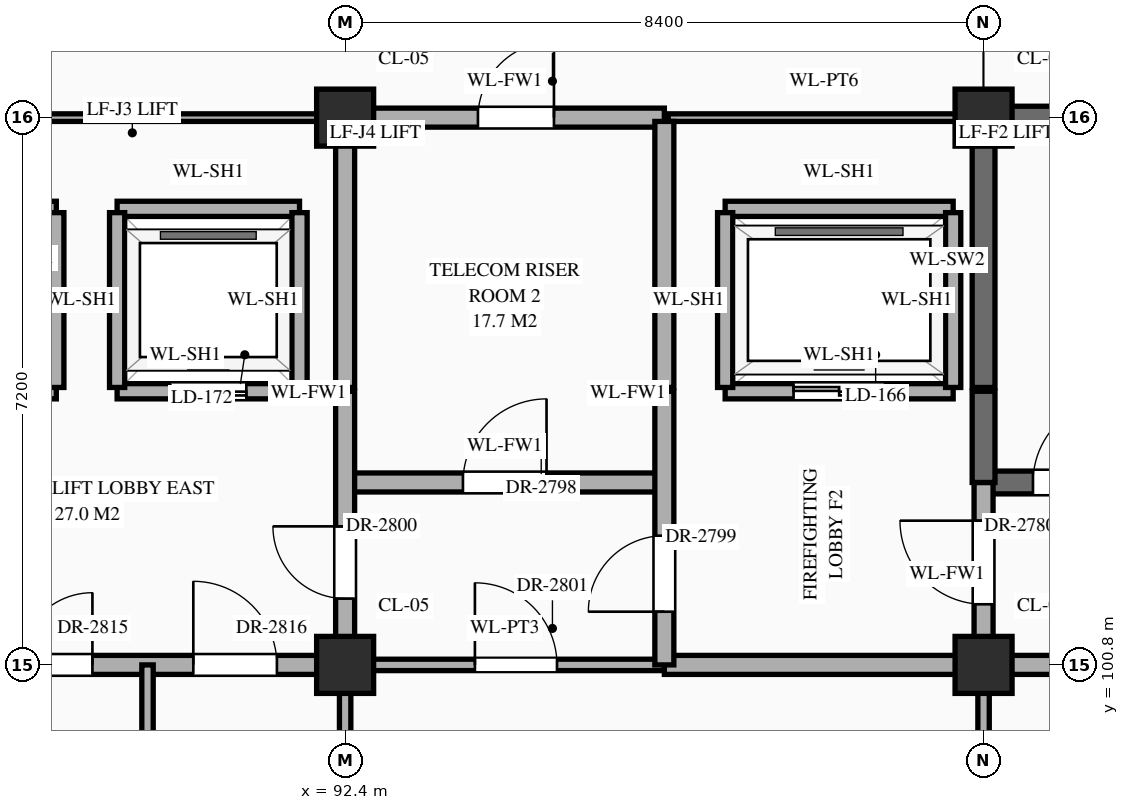
"""IFC4 building model, lengths in metres.
Left out: names, types, materials, properties, quantities, classifications, styles, units other than length and angle.
Written with IfcOpenShell. Run it as: python <this file> out.ifc"""

import sys

from ifc_helpers import new_model, si_unit, direction, frame, frame_2d, origin, origin_2d, place, context, subcontext, project, spatial, rectangle, extrude, element, fill, save


model = new_model("IFC4")
c1 = context("Model", 3, precision=1e-05, world=origin(), true_north=direction((0.0, 1.0)))
c2 = subcontext(c1, "Body", "Model", "MODEL_VIEW")
j1 = project(units=[si_unit("LENGTHUNIT", "METRE"), si_unit("PLANEANGLEUNIT", "RADIAN")], contexts=[c1])
p1 = place(None, origin())
s1 = spatial("IfcSite", under=j1, at=p1, CompositionType="ELEMENT")
p2 = place(p1, origin())
s2 = spatial("IfcBuilding", under=s1, at=p2, CompositionType="ELEMENT")
p3 = place(p2, frame((0.0, 0.0, 43.5)))
s3 = spatial("IfcBuildingStorey", under=s2, at=p3, CompositionType="ELEMENT", Elevation=43.5)
for number, where, z_axis, x_axis in (
    (1, (92.4, 100.8, 0.0), (0.0, 0.0, 1.0), (1.0, 0.0, 0.0)),
    (2, (92.4, 108.0, 0.0), (0.0, 0.0, 1.0), (1.0, 0.0, 0.0)),
    (3, (100.8, 100.8, 0.0), (0.0, 0.0, 1.0), (1.0, 0.0, 0.0)),
    (4, (100.8, 108.0, 0.0), (0.0, 0.0, 1.0), (1.0, 0.0, 0.0)),
):
    element("IfcColumn", number, at=place(p3, frame(where, z_axis=z_axis, x_axis=x_axis)), inside=s3, PredefinedType="COLUMN", context=c2, shape_type="SweptSolid", body=[
        extrude(rectangle(XDim=0.75, YDim=0.75, at=origin_2d()), origin(), (0.0, 0.0, 1.0), 4.2),
    ])
p4 = place(p3, frame((75.6, 100.8, 0.0), z_axis=(0.0, 0.0, 1.0), x_axis=(1.0, 0.0, 0.0)))
e5 = element("IfcWall", 5, at=p4, inside=s3, PredefinedType="STANDARD", context=c2, shape_type="SweptSolid", body=[
    extrude(rectangle(XDim=16.8, YDim=0.25, at=frame_2d((8.4, 0.0))), origin(), (0.0, 0.0, 1.0), 3.1),
])
p5 = place(p4, frame((3.725, 0.0, 0.0)))
e6 = element("IfcOpeningElement", 6, at=p5, cuts=e5, PredefinedType="OPENING", context=c2, shape_type="SweptSolid", body=[
    extrude(rectangle(XDim=0.95, YDim=2.15, at=frame_2d((0.475, 1.075))), frame((0.0, 0.137, 0.0), z_axis=(0.0, -1.0, 0.0), x_axis=(1.0, 0.0, 0.0)), (0.0, 0.0, 1.0), 0.274),
])
p6 = place(p4, frame((9.748, 0.0, 0.0)))
e7 = element("IfcOpeningElement", 7, at=p6, cuts=e5, PredefinedType="OPENING", context=c2, shape_type="SweptSolid", body=[
    extrude(rectangle(XDim=1.0, YDim=2.2, at=frame_2d((0.5, 1.1))), frame((0.0, 0.137, 0.0), z_axis=(0.0, -1.0, 0.0), x_axis=(1.0, 0.0, 0.0)), (0.0, 0.0, 1.0), 0.274),
])
p7 = place(p4, frame((12.525, 0.0, 0.0)))
e8 = element("IfcOpeningElement", 8, at=p7, cuts=e5, PredefinedType="OPENING", context=c2, shape_type="SweptSolid", body=[
    extrude(rectangle(XDim=0.95, YDim=2.15, at=frame_2d((0.475, 1.075))), frame((0.0, 0.137, 0.0), z_axis=(0.0, -1.0, 0.0), x_axis=(1.0, 0.0, 0.0)), (0.0, 0.0, 1.0), 0.274),
])
p8 = place(p4, frame((14.802, 0.0, 0.0)))
e9 = element("IfcOpeningElement", 9, at=p8, cuts=e5, PredefinedType="OPENING", context=c2, shape_type="SweptSolid", body=[
    extrude(rectangle(XDim=1.1, YDim=2.2, at=frame_2d((0.55, 1.1))), frame((0.0, 0.137, 0.0), z_axis=(0.0, -1.0, 0.0), x_axis=(1.0, 0.0, 0.0)), (0.0, 0.0, 1.0), 0.274),
])
p9 = place(p3, frame((92.4, 100.8, 0.0), z_axis=(0.0, 0.0, 1.0), x_axis=(1.0, 0.0, 0.0)))
e10 = element("IfcWall", 10, at=p9, inside=s3, PredefinedType="STANDARD", context=c2, shape_type="SweptSolid", body=[
    extrude(rectangle(XDim=4.2, YDim=0.15, at=frame_2d((2.1, 0.0))), origin(), (0.0, 0.0, 1.0), 3.1),
])
p10 = place(p9, frame((1.708, 0.0, 0.0)))
e11 = element("IfcOpeningElement", 11, at=p10, cuts=e10, PredefinedType="OPENING", context=c2, shape_type="SweptSolid", body=[
    extrude(rectangle(XDim=1.08, YDim=2.25, at=frame_2d((0.54, 1.125))), frame((0.0, 0.087, 0.0), z_axis=(0.0, -1.0, 0.0), x_axis=(1.0, 0.0, 0.0)), (0.0, 0.0, 1.0), 0.174),
])
p11 = place(p3, frame((96.6, 100.8, 0.0), z_axis=(0.0, 0.0, 1.0), x_axis=(1.0, 0.0, 0.0)))
e12 = element("IfcWall", 12, at=p11, inside=s3, PredefinedType="STANDARD", context=c2, shape_type="SweptSolid", body=[
    extrude(rectangle(XDim=12.6, YDim=0.25, at=frame_2d((6.3, 0.0))), origin(), (0.0, 0.0, 1.0), 3.1),
])
p12 = place(p11, frame((7.925, 0.0, 0.0)))
e13 = element("IfcOpeningElement", 13, at=p12, cuts=e12, PredefinedType="OPENING", context=c2, shape_type="SweptSolid", body=[
    extrude(rectangle(XDim=0.95, YDim=2.15, at=frame_2d((0.475, 1.075))), frame((0.0, 0.137, 0.0), z_axis=(0.0, -1.0, 0.0), x_axis=(1.0, 0.0, 0.0)), (0.0, 0.0, 1.0), 0.274),
])
p13 = place(p3, frame((92.4, 103.2, 0.0), z_axis=(0.0, 0.0, 1.0), x_axis=(1.0, 0.0, 0.0)))
e14 = element("IfcWall", 14, at=p13, inside=s3, PredefinedType="STANDARD", context=c2, shape_type="SweptSolid", body=[
    extrude(rectangle(XDim=4.2, YDim=0.25, at=frame_2d((2.1, 0.0))), origin(), (0.0, 0.0, 1.0), 3.95),
])
p14 = place(p13, frame((1.55, 0.0, 0.0)))
e15 = element("IfcOpeningElement", 15, at=p14, cuts=e14, PredefinedType="OPENING", context=c2, shape_type="SweptSolid", body=[
    extrude(rectangle(XDim=1.1, YDim=2.2, at=frame_2d((0.55, 1.1))), frame((0.0, 0.137, 0.0), z_axis=(0.0, -1.0, 0.0), x_axis=(1.0, 0.0, 0.0)), (0.0, 0.0, 1.0), 0.274),
])
p15 = place(p3, frame((100.8, 103.2, 0.0), z_axis=(0.0, 0.0, 1.0), x_axis=(1.0, 0.0, 0.0)))
e16 = element("IfcWall", 16, at=p15, inside=s3, PredefinedType="SHEAR", context=c2, shape_type="SweptSolid", body=[
    extrude(rectangle(XDim=8.4, YDim=0.3, at=frame_2d((4.2, 0.0))), origin(), (0.0, 0.0, 1.0), 3.95),
])
p16 = place(p15, frame((0.65, 0.0, 0.0)))
e17 = element("IfcOpeningElement", 17, at=p16, cuts=e16, PredefinedType="OPENING", context=c2, shape_type="SweptSolid", body=[
    extrude(rectangle(XDim=1.1, YDim=2.2, at=frame_2d((0.55, 1.1))), frame((0.0, 0.162, 0.0), z_axis=(0.0, -1.0, 0.0), x_axis=(1.0, 0.0, 0.0)), (0.0, 0.0, 1.0), 0.324),
])
p17 = place(p3, frame((86.2, 104.4, 0.0), z_axis=(0.0, 0.0, 1.0), x_axis=(1.0, 0.0, 0.0)))
e18 = element("IfcWall", 18, at=p17, inside=s3, PredefinedType="STANDARD", context=c2, shape_type="SweptSolid", body=[
    extrude(rectangle(XDim=2.4, YDim=0.2, at=frame_2d((1.2, 0.0))), origin(), (0.0, 0.0, 1.0), 3.95),
])
p18 = place(p17, frame((0.7, 0.0, 0.0)))
e19 = element("IfcOpeningElement", 19, at=p18, cuts=e18, PredefinedType="OPENING", context=c2, shape_type="SweptSolid", body=[
    extrude(rectangle(XDim=1.0, YDim=2.15, at=frame_2d((0.5, 1.075))), frame((0.0, 0.112, 0.0), z_axis=(0.0, -1.0, 0.0), x_axis=(1.0, 0.0, 0.0)), (0.0, 0.0, 1.0), 0.224),
])
p19 = place(p3, frame((89.4, 104.4, 0.0), z_axis=(0.0, 0.0, 1.0), x_axis=(1.0, 0.0, 0.0)))
e20 = element("IfcWall", 20, at=p19, inside=s3, PredefinedType="STANDARD", context=c2, shape_type="SweptSolid", body=[
    extrude(rectangle(XDim=2.4, YDim=0.2, at=frame_2d((1.2, 0.0))), origin(), (0.0, 0.0, 1.0), 3.95),
])
p20 = place(p19, frame((0.7, 0.0, 0.0)))
e21 = element("IfcOpeningElement", 21, at=p20, cuts=e20, PredefinedType="OPENING", context=c2, shape_type="SweptSolid", body=[
    extrude(rectangle(XDim=1.0, YDim=2.15, at=frame_2d((0.5, 1.075))), frame((0.0, 0.112, 0.0), z_axis=(0.0, -1.0, 0.0), x_axis=(1.0, 0.0, 0.0)), (0.0, 0.0, 1.0), 0.224),
])
p21 = place(p3, frame((97.4, 104.4, 0.0), z_axis=(0.0, 0.0, 1.0), x_axis=(1.0, 0.0, 0.0)))
e22 = element("IfcWall", 22, at=p21, inside=s3, PredefinedType="STANDARD", context=c2, shape_type="SweptSolid", body=[
    extrude(rectangle(XDim=3.0, YDim=0.2, at=frame_2d((1.5, 0.0))), origin(), (0.0, 0.0, 1.0), 3.95),
])
p22 = place(p21, frame((0.9, 0.0, 0.0)))
e23 = element("IfcOpeningElement", 23, at=p22, cuts=e22, PredefinedType="OPENING", context=c2, shape_type="SweptSolid", body=[
    extrude(rectangle(XDim=1.2, YDim=2.15, at=frame_2d((0.6, 1.075))), frame((0.0, 0.112, 0.0), z_axis=(0.0, -1.0, 0.0), x_axis=(1.0, 0.0, 0.0)), (0.0, 0.0, 1.0), 0.224),
])
for number, where, z_axis, x_axis in (
    (24, (86.2, 106.8, 0.0), (0.0, 0.0, 1.0), (1.0, 0.0, 0.0)),
    (25, (89.4, 106.8, 0.0), (0.0, 0.0, 1.0), (1.0, 0.0, 0.0)),
):
    element("IfcWall", number, at=place(p3, frame(where, z_axis=z_axis, x_axis=x_axis)), inside=s3, PredefinedType="STANDARD", context=c2, shape_type="SweptSolid", body=[
        extrude(rectangle(XDim=2.4, YDim=0.2, at=frame_2d((1.2, 0.0))), origin(), (0.0, 0.0, 1.0), 3.95),
    ])
p23 = place(p3, frame((97.4, 106.8, 0.0), z_axis=(0.0, 0.0, 1.0), x_axis=(1.0, 0.0, 0.0)))
e26 = element("IfcWall", 26, at=p23, inside=s3, PredefinedType="STANDARD", context=c2, shape_type="SweptSolid", body=[
    extrude(rectangle(XDim=3.0, YDim=0.2, at=frame_2d((1.5, 0.0))), origin(), (0.0, 0.0, 1.0), 3.95),
])
p24 = place(p3, frame((86.2, 108.0, 0.0), z_axis=(0.0, 0.0, 1.0), x_axis=(1.0, 0.0, 0.0)))
e27 = element("IfcWall", 27, at=p24, inside=s3, PredefinedType="STANDARD", context=c2, shape_type="SweptSolid", body=[
    extrude(rectangle(XDim=6.15, YDim=0.1, at=frame_2d((3.075, 0.0))), origin(), (0.0, 0.0, 1.0), 3.1),
])
p25 = place(p3, frame((92.4, 108.0, 0.0), z_axis=(0.0, 0.0, 1.0), x_axis=(1.0, 0.0, 0.0)))
e28 = element("IfcWall", 28, at=p25, inside=s3, PredefinedType="STANDARD", context=c2, shape_type="SweptSolid", body=[
    extrude(rectangle(XDim=4.2, YDim=0.25, at=frame_2d((2.1, 0.0))), origin(), (0.0, 0.0, 1.0), 3.1),
])
p26 = place(p25, frame((1.748, 0.0, 0.0)))
e29 = element("IfcOpeningElement", 29, at=p26, cuts=e28, PredefinedType="OPENING", context=c2, shape_type="SweptSolid", body=[
    extrude(rectangle(XDim=1.0, YDim=2.2, at=frame_2d((0.5, 1.1))), frame((0.0, 0.137, 0.0), z_axis=(0.0, -1.0, 0.0), x_axis=(1.0, 0.0, 0.0)), (0.0, 0.0, 1.0), 0.274),
])
p27 = place(p3, frame((96.65, 108.0, 0.0), z_axis=(0.0, 0.0, 1.0), x_axis=(1.0, 0.0, 0.0)))
e30 = element("IfcWall", 30, at=p27, inside=s3, PredefinedType="STANDARD", context=c2, shape_type="SweptSolid", body=[
    extrude(rectangle(XDim=4.1, YDim=0.1, at=frame_2d((2.05, 0.0))), origin(), (0.0, 0.0, 1.0), 3.1),
])
p28 = place(p3, frame((100.8, 108.0, 0.0), z_axis=(0.0, 0.0, 1.0), x_axis=(1.0, 0.0, 0.0)))
e31 = element("IfcWall", 31, at=p28, inside=s3, PredefinedType="SHEAR", context=c2, shape_type="SweptSolid", body=[
    extrude(rectangle(XDim=8.4, YDim=0.3, at=frame_2d((4.2, 0.0))), origin(), (0.0, 0.0, 1.0), 3.95),
])
for number, where, z_axis, x_axis in (
    (32, (88.6, 104.45, 0.0), (0.0, 0.0, 1.0), (0.0, 1.0, 0.0)),
    (33, (89.4, 104.45, 0.0), (0.0, 0.0, 1.0), (0.0, 1.0, 0.0)),
):
    element("IfcWall", number, at=place(p3, frame(where, z_axis=z_axis, x_axis=x_axis)), inside=s3, PredefinedType="STANDARD", context=c2, shape_type="SweptSolid", body=[
        extrude(rectangle(XDim=2.3, YDim=0.2, at=frame_2d((1.15, 0.0))), origin(), (0.0, 0.0, 1.0), 3.95),
    ])
p29 = place(p3, frame((89.8, 96.0, 0.0), z_axis=(0.0, 0.0, 1.0), x_axis=(0.0, 1.0, 0.0)))
e34 = element("IfcWall", 34, at=p29, inside=s3, PredefinedType="STANDARD", context=c2, shape_type="SweptSolid", body=[
    extrude(rectangle(XDim=4.8, YDim=0.15, at=frame_2d((2.4, 0.0))), origin(), (0.0, 0.0, 1.0), 3.95),
])
p30 = place(p29, frame((1.84, 0.0, 0.0)))
e35 = element("IfcOpeningElement", 35, at=p30, cuts=e34, PredefinedType="OPENING", context=c2, shape_type="SweptSolid", body=[
    extrude(rectangle(XDim=1.12, YDim=2.25, at=frame_2d((0.56, 1.125))), frame((0.0, 0.087, 0.0), z_axis=(0.0, -1.0, 0.0), x_axis=(1.0, 0.0, 0.0)), (0.0, 0.0, 1.0), 0.174),
])
p31 = place(p3, frame((91.8, 104.45, 0.0), z_axis=(0.0, 0.0, 1.0), x_axis=(0.0, 1.0, 0.0)))
e36 = element("IfcWall", 36, at=p31, inside=s3, PredefinedType="STANDARD", context=c2, shape_type="SweptSolid", body=[
    extrude(rectangle(XDim=2.3, YDim=0.2, at=frame_2d((1.15, 0.0))), origin(), (0.0, 0.0, 1.0), 3.95),
])
p32 = place(p3, frame((92.4, 96.0, 0.0), z_axis=(0.0, 0.0, 1.0), x_axis=(0.0, 1.0, 0.0)))
e37 = element("IfcWall", 37, at=p32, inside=s3, PredefinedType="STANDARD", context=c2, shape_type="SweptSolid", body=[
    extrude(rectangle(XDim=4.8, YDim=0.15, at=frame_2d((2.4, 0.0))), origin(), (0.0, 0.0, 1.0), 3.2),
])
p33 = place(p3, frame((92.4, 100.8, 0.0), z_axis=(0.0, 0.0, 1.0), x_axis=(0.0, 1.0, 0.0)))
e38 = element("IfcWall", 38, at=p33, inside=s3, PredefinedType="STANDARD", context=c2, shape_type="SweptSolid", body=[
    extrude(rectangle(XDim=3.6, YDim=0.25, at=frame_2d((1.8, 0.0))), origin(), (0.0, 0.0, 1.0), 3.2),
])
p34 = place(p33, frame((0.873, 0.0, 0.0)))
e39 = element("IfcOpeningElement", 39, at=p34, cuts=e38, PredefinedType="OPENING", context=c2, shape_type="SweptSolid", body=[
    extrude(rectangle(XDim=0.95, YDim=2.15, at=frame_2d((0.475, 1.075))), frame((0.0, 0.137, 0.0), z_axis=(0.0, -1.0, 0.0), x_axis=(1.0, 0.0, 0.0)), (0.0, 0.0, 1.0), 0.274),
])
p35 = place(p3, frame((92.4, 104.45, 0.0), z_axis=(0.0, 0.0, 1.0), x_axis=(0.0, 1.0, 0.0)))
e40 = element("IfcWall", 40, at=p35, inside=s3, PredefinedType="STANDARD", context=c2, shape_type="SweptSolid", body=[
    extrude(rectangle(XDim=3.5, YDim=0.25, at=frame_2d((1.75, 0.0))), origin(), (0.0, 0.0, 1.0), 3.2),
])
p36 = place(p3, frame((96.6, 100.8, 0.0), z_axis=(0.0, 0.0, 1.0), x_axis=(0.0, 1.0, 0.0)))
e41 = element("IfcWall", 41, at=p36, inside=s3, PredefinedType="STANDARD", context=c2, shape_type="SweptSolid", body=[
    extrude(rectangle(XDim=3.6, YDim=0.25, at=frame_2d((1.8, 0.0))), origin(), (0.0, 0.0, 1.0), 3.95),
])
p37 = place(p36, frame((0.7, 0.0, 0.0)))
e42 = element("IfcOpeningElement", 42, at=p37, cuts=e41, PredefinedType="OPENING", context=c2, shape_type="SweptSolid", body=[
    extrude(rectangle(XDim=1.0, YDim=2.2, at=frame_2d((0.5, 1.1))), frame((0.0, 0.137, 0.0), z_axis=(0.0, -1.0, 0.0), x_axis=(1.0, 0.0, 0.0)), (0.0, 0.0, 1.0), 0.274),
])
p38 = place(p3, frame((96.6, 104.45, 0.0), z_axis=(0.0, 0.0, 1.0), x_axis=(0.0, 1.0, 0.0)))
e43 = element("IfcWall", 43, at=p38, inside=s3, PredefinedType="STANDARD", context=c2, shape_type="SweptSolid", body=[
    extrude(rectangle(XDim=3.5, YDim=0.25, at=frame_2d((1.75, 0.0))), origin(), (0.0, 0.0, 1.0), 3.95),
])
for number, where, z_axis, x_axis in (
    (44, (97.4, 104.45, 0.0), (0.0, 0.0, 1.0), (0.0, 1.0, 0.0)),
    (45, (100.4, 104.45, 0.0), (0.0, 0.0, 1.0), (0.0, 1.0, 0.0)),
):
    element("IfcWall", number, at=place(p3, frame(where, z_axis=z_axis, x_axis=x_axis)), inside=s3, PredefinedType="STANDARD", context=c2, shape_type="SweptSolid", body=[
        extrude(rectangle(XDim=2.3, YDim=0.2, at=frame_2d((1.15, 0.0))), origin(), (0.0, 0.0, 1.0), 3.95),
    ])
p39 = place(p3, frame((100.8, 96.0, 0.0), z_axis=(0.0, 0.0, 1.0), x_axis=(0.0, 1.0, 0.0)))
e46 = element("IfcWall", 46, at=p39, inside=s3, PredefinedType="STANDARD", context=c2, shape_type="SweptSolid", body=[
    extrude(rectangle(XDim=4.8, YDim=0.15, at=frame_2d((2.4, 0.0))), origin(), (0.0, 0.0, 1.0), 3.2),
])
p40 = place(p3, frame((100.8, 100.8, 0.0), z_axis=(0.0, 0.0, 1.0), x_axis=(0.0, 1.0, 0.0)))
e47 = element("IfcWall", 47, at=p40, inside=s3, PredefinedType="STANDARD", context=c2, shape_type="SweptSolid", body=[
    extrude(rectangle(XDim=2.4, YDim=0.25, at=frame_2d((1.2, 0.0))), origin(), (0.0, 0.0, 1.0), 3.2),
])
p41 = place(p40, frame((0.798, 0.0, 0.0)))
e48 = element("IfcOpeningElement", 48, at=p41, cuts=e47, PredefinedType="OPENING", context=c2, shape_type="SweptSolid", body=[
    extrude(rectangle(XDim=1.1, YDim=2.2, at=frame_2d((0.55, 1.1))), frame((0.0, 0.137, 0.0), z_axis=(0.0, -1.0, 0.0), x_axis=(1.0, 0.0, 0.0)), (0.0, 0.0, 1.0), 0.274),
])
p42 = place(p3, frame((100.8, 103.2, 0.0), z_axis=(0.0, 0.0, 1.0), x_axis=(0.0, 1.0, 0.0)))
e49 = element("IfcWall", 49, at=p42, inside=s3, PredefinedType="SHEAR", context=c2, shape_type="SweptSolid", body=[
    extrude(rectangle(XDim=1.2, YDim=0.3, at=frame_2d((0.6, 0.0))), origin(), (0.0, 0.0, 1.0), 3.95),
])
p43 = place(p3, frame((100.8, 104.45, 0.0), z_axis=(0.0, 0.0, 1.0), x_axis=(0.0, 1.0, 0.0)))
e50 = element("IfcWall", 50, at=p43, inside=s3, PredefinedType="SHEAR", context=c2, shape_type="SweptSolid", body=[
    extrude(rectangle(XDim=3.5, YDim=0.3, at=frame_2d((1.75, 0.0))), origin(), (0.0, 0.0, 1.0), 3.95),
])
p44 = place(p22, origin())
e51 = element("IfcDoor", 51, at=p44, inside=s3, OperationType="DOUBLE_DOOR_SLIDING", PredefinedType="DOOR", context=c2, shape_type="SweptSolid", body=[
    extrude(rectangle(XDim=1.2, YDim=2.15, at=frame_2d((0.6, 1.075))), frame((0.0, 0.025, 0.0), z_axis=(0.0, -1.0, 0.0), x_axis=(1.0, 0.0, 0.0)), (0.0, 0.0, 1.0), 0.05),
])
fill(e23, e51)
p45 = place(p20, origin())
e52 = element("IfcDoor", 52, at=p45, inside=s3, OperationType="DOUBLE_DOOR_SLIDING", PredefinedType="DOOR", context=c2, shape_type="SweptSolid", body=[
    extrude(rectangle(XDim=1.0, YDim=2.15, at=frame_2d((0.5, 1.075))), frame((0.0, 0.025, 0.0), z_axis=(0.0, -1.0, 0.0), x_axis=(1.0, 0.0, 0.0)), (0.0, 0.0, 1.0), 0.05),
])
fill(e21, e52)
p46 = place(p16, origin())
e53 = element("IfcDoor", 53, at=p46, inside=s3, OperationType="SINGLE_SWING_RIGHT", PredefinedType="DOOR", context=c2, shape_type="SweptSolid", body=[
    extrude(rectangle(XDim=1.1, YDim=2.2, at=frame_2d((0.55, 1.1))), frame((0.0, 0.025, 0.0), z_axis=(0.0, -1.0, 0.0), x_axis=(1.0, 0.0, 0.0)), (0.0, 0.0, 1.0), 0.05),
])
fill(e17, e53)
p47 = place(p41, origin())
e54 = element("IfcDoor", 54, at=p47, inside=s3, OperationType="SINGLE_SWING_RIGHT", PredefinedType="DOOR", context=c2, shape_type="SweptSolid", body=[
    extrude(rectangle(XDim=1.1, YDim=2.2, at=frame_2d((0.55, 1.1))), frame((0.0, 0.025, 0.0), z_axis=(0.0, -1.0, 0.0), x_axis=(1.0, 0.0, 0.0)), (0.0, 0.0, 1.0), 0.05),
])
fill(e48, e54)
p48 = place(p14, origin())
e55 = element("IfcDoor", 55, at=p48, inside=s3, OperationType="SINGLE_SWING_RIGHT", PredefinedType="DOOR", context=c2, shape_type="SweptSolid", body=[
    extrude(rectangle(XDim=1.1, YDim=2.2, at=frame_2d((0.55, 1.1))), frame((0.0, 0.025, 0.0), z_axis=(0.0, -1.0, 0.0), x_axis=(1.0, 0.0, 0.0)), (0.0, 0.0, 1.0), 0.05),
])
fill(e15, e55)
p49 = place(p37, origin())
e56 = element("IfcDoor", 56, at=p49, inside=s3, OperationType="SINGLE_SWING_LEFT", PredefinedType="DOOR", context=c2, shape_type="SweptSolid", body=[
    extrude(rectangle(XDim=1.0, YDim=2.2, at=frame_2d((0.5, 1.1))), frame((0.0, 0.025, 0.0), z_axis=(0.0, -1.0, 0.0), x_axis=(1.0, 0.0, 0.0)), (0.0, 0.0, 1.0), 0.05),
])
fill(e42, e56)
p50 = place(p34, origin())
e57 = element("IfcDoor", 57, at=p50, inside=s3, OperationType="SINGLE_SWING_RIGHT", PredefinedType="DOOR", context=c2, shape_type="SweptSolid", body=[
    extrude(rectangle(XDim=0.95, YDim=2.15, at=frame_2d((0.475, 1.075))), frame((0.0, 0.025, 0.0), z_axis=(0.0, -1.0, 0.0), x_axis=(1.0, 0.0, 0.0)), (0.0, 0.0, 1.0), 0.05),
])
fill(e39, e57)
p51 = place(p10, origin())
e58 = element("IfcDoor", 58, at=p51, inside=s3, OperationType="SINGLE_SWING_LEFT", PredefinedType="DOOR", context=c2, shape_type="SweptSolid", body=[
    extrude(rectangle(XDim=1.08, YDim=2.25, at=frame_2d((0.54, 1.125))), frame((0.0, 0.025, 0.0), z_axis=(0.0, -1.0, 0.0), x_axis=(1.0, 0.0, 0.0)), (0.0, 0.0, 1.0), 0.05),
])
fill(e11, e58)
p52 = place(p26, origin())
e59 = element("IfcDoor", 59, at=p52, inside=s3, OperationType="SINGLE_SWING_RIGHT", PredefinedType="DOOR", context=c2, shape_type="SweptSolid", body=[
    extrude(rectangle(XDim=1.0, YDim=2.2, at=frame_2d((0.5, 1.1))), frame((0.0, 0.025, 0.0), z_axis=(0.0, -1.0, 0.0), x_axis=(1.0, 0.0, 0.0)), (0.0, 0.0, 1.0), 0.05),
])
fill(e29, e59)
p53 = place(p7, origin())
e60 = element("IfcDoor", 60, at=p53, inside=s3, OperationType="SINGLE_SWING_RIGHT", PredefinedType="DOOR", context=c2, shape_type="SweptSolid", body=[
    extrude(rectangle(XDim=0.95, YDim=2.15, at=frame_2d((0.475, 1.075))), frame((0.0, 0.025, 0.0), z_axis=(0.0, -1.0, 0.0), x_axis=(1.0, 0.0, 0.0)), (0.0, 0.0, 1.0), 0.05),
])
fill(e8, e60)
p54 = place(p8, origin())
e61 = element("IfcDoor", 61, at=p54, inside=s3, OperationType="SINGLE_SWING_LEFT", PredefinedType="DOOR", context=c2, shape_type="SweptSolid", body=[
    extrude(rectangle(XDim=1.1, YDim=2.2, at=frame_2d((0.55, 1.1))), frame((0.0, 0.025, 0.0), z_axis=(0.0, -1.0, 0.0), x_axis=(1.0, 0.0, 0.0)), (0.0, 0.0, 1.0), 0.05),
])
fill(e9, e61)
save(model, sys.argv[1])
